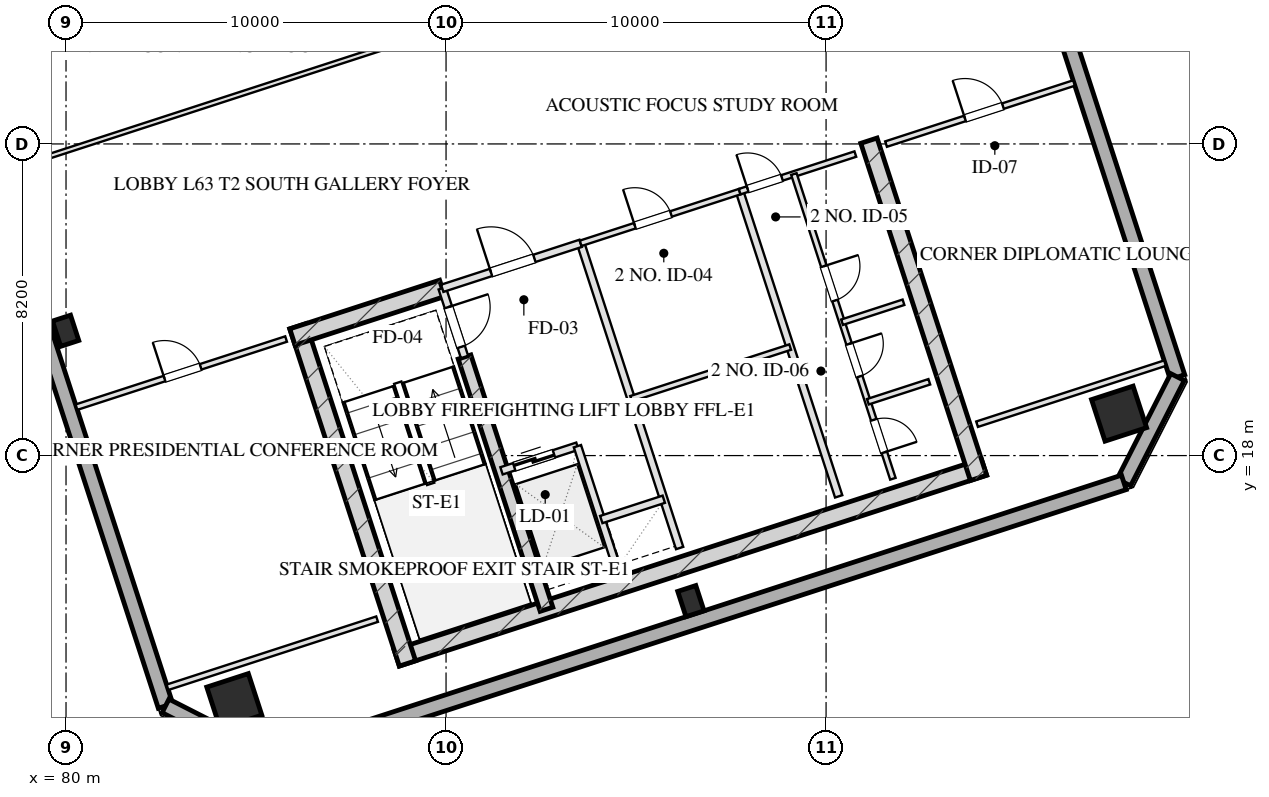
"""IFC4 building model, lengths in metres.
Left out: names, types, materials, properties, quantities, classifications, styles, units other than length and angle.
Written with IfcOpenShell. Run it as: python <this file> out.ifc"""

import sys

from ifc_helpers import new_model, si_unit, direction, frame, frame_2d, origin, origin_2d, place, context, subcontext, project, spatial, rectangle, hollow_rectangle, extrude, element, fill, save


model = new_model("IFC4")
c1 = context("Model", 3, precision=1e-05, world=origin(), true_north=direction((0.0, 1.0)))
c2 = subcontext(c1, "Body", "Model", "MODEL_VIEW")
j1 = project(units=[si_unit("LENGTHUNIT", "METRE"), si_unit("PLANEANGLEUNIT", "RADIAN")], contexts=[c1])
p1 = place(None, origin())
s1 = spatial("IfcSite", under=j1, at=p1, CompositionType="ELEMENT")
p2 = place(p1, origin())
s2 = spatial("IfcBuilding", under=s1, at=p2, CompositionType="ELEMENT")
p3 = place(p2, frame((0.0, 0.0, 234.4)))
s3 = spatial("IfcBuildingStorey", under=s2, at=p3, CompositionType="ELEMENT", Elevation=234.4)
p4 = place(p3, frame((88.701, 12.675, 0.0), z_axis=(0.0, 0.0, 1.0), x_axis=(0.95105824505, 0.309011673763, 0.0)))
e1 = element("IfcWall", 1, at=p4, inside=s3, PredefinedType="SHEAR", context=c2, shape_type="SweptSolid", body=[
    extrude(rectangle(XDim=16.25, YDim=0.45, at=frame_2d((8.125, 0.0))), origin(), (0.0, 0.0, 1.0), 3.2),
])
for number, where, z_axis, x_axis in (
    (2, (86.102, 21.404, 0.0), (0.0, 0.0, 1.0), (0.309, -0.951, 0.0)),
    (3, (101.128, 26.286, 0.0), (0.0, 0.0, 1.0), (0.309, -0.951, 0.0)),
):
    element("IfcWall", number, at=place(p3, frame(where, z_axis=z_axis, x_axis=x_axis)), inside=s3, PredefinedType="SHEAR", context=c2, shape_type="SweptSolid", body=[
        extrude(rectangle(XDim=9.33, YDim=0.45, at=frame_2d((4.665, 0.0))), origin(), (0.0, 0.0, 1.0), 3.2),
    ])
p5 = place(p3, frame((90.486, 20.594, 0.0), z_axis=(0.0, 0.0, 1.0), x_axis=(0.309020428229, -0.951055400562, 0.0)))
e4 = element("IfcWall", 4, at=p5, inside=s3, PredefinedType="SHEAR", context=c2, shape_type="SweptSolid", body=[
    extrude(rectangle(XDim=6.98, YDim=0.35, at=frame_2d((3.49, 0.0))), origin(), (0.0, 0.0, 1.0), 3.2),
])
p6 = place(p3, frame((85.957, 21.12, 0.0), z_axis=(0.0, 0.0, 1.0), x_axis=(0.951064796122, 0.308991510526, 0.0)))
e5 = element("IfcWall", 5, at=p6, inside=s3, PredefinedType="SHEAR", context=c2, shape_type="SweptSolid", body=[
    extrude(rectangle(XDim=4.145, YDim=0.45, at=frame_2d((2.073, 0.0))), origin(), (0.0, 0.0, 1.0), 3.2),
])
for number, where, z_axis, x_axis in (
    (6, (84.428, 11.539, 0.0), (0.0, 0.0, 1.0), (0.951, 0.309, 0.0)),
    (7, (107.71, 19.104, 0.0), (0.0, 0.0, 1.0), (0.951, 0.309, 0.0)),
):
    element("IfcColumn", number, at=place(p3, frame(where, z_axis=z_axis, x_axis=x_axis)), inside=s3, PredefinedType="COLUMN", context=c2, shape_type="SweptSolid", body=[
        extrude(hollow_rectangle(XDim=1.15, YDim=1.15, WallThickness=0.04, at=origin_2d()), origin(), (0.0, 0.0, 1.0), 3.201),
    ])
for number, where, z_axis, x_axis in (
    (8, (79.99, 21.284, 0.0), (0.0, 0.0, 1.0), (0.951, 0.309, 0.0)),
    (9, (96.443, 14.17, 0.0), (0.0, 0.0, 1.0), (0.951, 0.309, 0.0)),
):
    element("IfcColumn", number, at=place(p3, frame(where, z_axis=z_axis, x_axis=x_axis)), inside=s3, PredefinedType="COLUMN", context=c2, shape_type="SweptSolid", body=[
        extrude(hollow_rectangle(XDim=0.5, YDim=0.7, WallThickness=0.025, at=origin_2d()), origin(), (0.0, 0.0, 1.0), 3.201),
    ])
p7 = place(p3, frame((82.618, 11.414, 0.0), z_axis=(0.0, 0.0, 1.0), x_axis=(-0.309016491071, 0.951056679828, 0.0)))
e10 = element("IfcWall", 10, at=p7, inside=s3, PredefinedType="SOLIDWALL", context=c2, shape_type="SweptSolid", body=[
    extrude(rectangle(XDim=38.4, YDim=0.4, at=frame_2d((19.2, 0.0))), origin(), (0.0, 0.0, 1.0), 2.36),
])
p8 = place(p7, frame((11.825, 0.0, 0.75)))
e11 = element("IfcOpeningElement", 11, at=p8, cuts=e10, PredefinedType="OPENING", context=c2, shape_type="SweptSolid", body=[
    extrude(rectangle(XDim=1.95, YDim=1.21, at=frame_2d((0.975, 0.605))), frame((0.0, 0.21, 0.0), z_axis=(0.0, -1.0, 0.0), x_axis=(1.0, 0.0, 0.0)), (0.0, 0.0, 1.0), 0.42),
])
p9 = place(p7, frame((15.625, 0.0, 0.75)))
e12 = element("IfcOpeningElement", 12, at=p9, cuts=e10, PredefinedType="OPENING", context=c2, shape_type="SweptSolid", body=[
    extrude(rectangle(XDim=1.95, YDim=1.21, at=frame_2d((0.975, 0.605))), frame((0.0, 0.21, 0.0), z_axis=(0.0, -1.0, 0.0), x_axis=(1.0, 0.0, 0.0)), (0.0, 0.0, 1.0), 0.42),
])
p10 = place(p7, frame((20.825, 0.0, 0.75)))
e13 = element("IfcOpeningElement", 13, at=p10, cuts=e10, PredefinedType="OPENING", context=c2, shape_type="SweptSolid", body=[
    extrude(rectangle(XDim=1.95, YDim=1.21, at=frame_2d((0.975, 0.605))), frame((0.0, 0.21, 0.0), z_axis=(0.0, -1.0, 0.0), x_axis=(1.0, 0.0, 0.0)), (0.0, 0.0, 1.0), 0.42),
])
p11 = place(p7, frame((24.625, 0.0, 0.75)))
e14 = element("IfcOpeningElement", 14, at=p11, cuts=e10, PredefinedType="OPENING", context=c2, shape_type="SweptSolid", body=[
    extrude(rectangle(XDim=1.95, YDim=1.21, at=frame_2d((0.975, 0.605))), frame((0.0, 0.21, 0.0), z_axis=(0.0, -1.0, 0.0), x_axis=(1.0, 0.0, 0.0)), (0.0, 0.0, 1.0), 0.42),
])
p12 = place(p3, frame((97.382, 56.586, 0.0), z_axis=(0.0, 0.0, 1.0), x_axis=(0.309016491071, -0.951056679828, 0.0)))
e15 = element("IfcWall", 15, at=p12, inside=s3, PredefinedType="SOLIDWALL", context=c2, shape_type="SweptSolid", body=[
    extrude(rectangle(XDim=38.4, YDim=0.4, at=frame_2d((19.2, 0.0))), origin(), (0.0, 0.0, 1.0), 2.36),
])
p13 = place(p12, frame((24.625, 0.0, 0.75)))
e16 = element("IfcOpeningElement", 16, at=p13, cuts=e15, PredefinedType="OPENING", context=c2, shape_type="SweptSolid", body=[
    extrude(rectangle(XDim=1.95, YDim=1.21, at=frame_2d((0.975, 0.605))), frame((0.0, 0.21, 0.0), z_axis=(0.0, -1.0, 0.0), x_axis=(1.0, 0.0, 0.0)), (0.0, 0.0, 1.0), 0.42),
])
p14 = place(p12, frame((20.825, 0.0, 0.75)))
e17 = element("IfcOpeningElement", 17, at=p14, cuts=e15, PredefinedType="OPENING", context=c2, shape_type="SweptSolid", body=[
    extrude(rectangle(XDim=1.95, YDim=1.21, at=frame_2d((0.975, 0.605))), frame((0.0, 0.21, 0.0), z_axis=(0.0, -1.0, 0.0), x_axis=(1.0, 0.0, 0.0)), (0.0, 0.0, 1.0), 0.42),
])
p15 = place(p12, frame((15.625, 0.0, 0.75)))
e18 = element("IfcOpeningElement", 18, at=p15, cuts=e15, PredefinedType="OPENING", context=c2, shape_type="SweptSolid", body=[
    extrude(rectangle(XDim=1.95, YDim=1.21, at=frame_2d((0.975, 0.605))), frame((0.0, 0.21, 0.0), z_axis=(0.0, -1.0, 0.0), x_axis=(1.0, 0.0, 0.0)), (0.0, 0.0, 1.0), 0.42),
])
p16 = place(p12, frame((11.825, 0.0, 0.75)))
e19 = element("IfcOpeningElement", 19, at=p16, cuts=e15, PredefinedType="OPENING", context=c2, shape_type="SweptSolid", body=[
    extrude(rectangle(XDim=1.95, YDim=1.21, at=frame_2d((0.975, 0.605))), frame((0.0, 0.21, 0.0), z_axis=(0.0, -1.0, 0.0), x_axis=(1.0, 0.0, 0.0)), (0.0, 0.0, 1.0), 0.42),
])
p17 = place(p3, frame((109.248, 20.066, 0.0), z_axis=(0.0, 0.0, 1.0), x_axis=(-0.453949291228, -0.891027519774, 0.0)))
e20 = element("IfcWall", 20, at=p17, inside=s3, PredefinedType="SOLIDWALL", context=c2, shape_type="SweptSolid", body=[
    extrude(rectangle(XDim=3.111, YDim=0.4, at=frame_2d((1.556, 0.0))), origin(), (0.0, 0.0, 1.0), 2.36),
])
p18 = place(p3, frame((107.835, 17.294, 0.0), z_axis=(0.0, 0.0, 1.0), x_axis=(-0.951058012937, -0.309012388148, 0.0)))
e21 = element("IfcWall", 21, at=p18, inside=s3, PredefinedType="SOLIDWALL", context=c2, shape_type="SweptSolid", body=[
    extrude(rectangle(XDim=23.6, YDim=0.4, at=frame_2d((11.8, 0.0))), origin(), (0.0, 0.0, 1.0), 2.36),
])
p19 = place(p3, frame((85.39, 10.001, 0.0), z_axis=(0.0, 0.0, 1.0), x_axis=(-0.890979603174, 0.454043331334, 0.0)))
e22 = element("IfcWall", 22, at=p19, inside=s3, PredefinedType="SOLIDWALL", context=c2, shape_type="SweptSolid", body=[
    extrude(rectangle(XDim=3.111, YDim=0.4, at=frame_2d((1.556, 0.0))), origin(), (0.0, 0.0, 1.0), 2.36),
])
p20 = place(p3, frame((89.899, 22.401, 0.0), z_axis=(0.0, 0.0, 1.0), x_axis=(0.308932062672, -0.951084108086, 0.0)))
e23 = element("IfcWall", 23, at=p20, inside=s3, PredefinedType="PARTITIONING", context=c2, shape_type="SweptSolid", body=[
    extrude(rectangle(XDim=1.9, YDim=0.2, at=frame_2d((0.95, 0.0))), origin(), (0.0, 0.0, 1.0), 2.925),
])
p21 = place(p20, frame((0.52, 0.0, 0.0)))
e24 = element("IfcOpeningElement", 24, at=p21, cuts=e23, PredefinedType="OPENING", context=c2, shape_type="SweptSolid", body=[
    extrude(rectangle(XDim=1.1, YDim=2.05, at=frame_2d((0.55, 1.025))), frame((0.0, 0.11, 0.0), z_axis=(0.0, -1.0, 0.0), x_axis=(1.0, 0.0, 0.0)), (0.0, 0.0, 1.0), 0.22),
])
p22 = place(p3, frame((93.542, 23.585, 0.0), z_axis=(0.0, 0.0, 1.0), x_axis=(0.309042196757, -0.951048327176, 0.0)))
e25 = element("IfcWall", 25, at=p22, inside=s3, PredefinedType="PARTITIONING", context=c2, shape_type="SweptSolid", body=[
    extrude(rectangle(XDim=8.43, YDim=0.2, at=frame_2d((4.215, 0.0))), origin(), (0.0, 0.0, 1.0), 2.925),
])
p23 = place(p3, frame((89.899, 22.401, 0.0), z_axis=(0.0, 0.0, 1.0), x_axis=(0.951046716504, 0.309047153403, 0.0)))
e26 = element("IfcWall", 26, at=p23, inside=s3, PredefinedType="PARTITIONING", context=c2, shape_type="SweptSolid", body=[
    extrude(rectangle(XDim=3.83, YDim=0.2, at=frame_2d((1.915, 0.0))), origin(), (0.0, 0.0, 1.0), 2.925),
])
p24 = place(p23, frame((1.35, 0.0, 0.0)))
e27 = element("IfcOpeningElement", 27, at=p24, cuts=e26, PredefinedType="OPENING", context=c2, shape_type="SweptSolid", body=[
    extrude(rectangle(XDim=1.2, YDim=2.05, at=frame_2d((0.6, 1.025))), frame((0.0, 0.11, 0.0), z_axis=(0.0, -1.0, 0.0), x_axis=(1.0, 0.0, 0.0)), (0.0, 0.0, 1.0), 0.22),
])
p25 = place(p3, frame((91.46, 17.598, 0.0), z_axis=(0.0, 0.0, 1.0), x_axis=(0.951062257173, 0.308999325213, 0.0)))
e28 = element("IfcWall", 28, at=p25, inside=s3, PredefinedType="PARTITIONING", context=c2, shape_type="SweptSolid", body=[
    extrude(rectangle(XDim=2.1, YDim=0.2, at=frame_2d((1.05, 0.0))), origin(), (0.0, 0.0, 1.0), 2.925),
])
p26 = place(p25, frame((0.35, 0.0, 0.0)))
e29 = element("IfcOpeningElement", 29, at=p26, cuts=e28, PredefinedType="OPENING", context=c2, shape_type="SweptSolid", body=[
    extrude(rectangle(XDim=1.1, YDim=2.05, at=frame_2d((0.55, 1.025))), frame((0.0, 0.11, 0.0), z_axis=(0.0, -1.0, 0.0), x_axis=(1.0, 0.0, 0.0)), (0.0, 0.0, 1.0), 0.22),
])
p27 = place(p3, frame((93.457, 18.247, 0.0), z_axis=(0.0, 0.0, 1.0), x_axis=(0.3089935693, -0.951064127245, 0.0)))
e30 = element("IfcWall", 30, at=p27, inside=s3, PredefinedType="PARTITIONING", context=c2, shape_type="SweptSolid", body=[
    extrude(rectangle(XDim=3.7, YDim=0.2, at=frame_2d((1.85, 0.0))), origin(), (0.0, 0.0, 1.0), 2.925),
])
p28 = place(p3, frame((94.084, 16.317, 0.0), z_axis=(0.0, 0.0, 1.0), x_axis=(0.951041328149, 0.309063734775, 0.0)))
e31 = element("IfcWall", 31, at=p28, inside=s3, PredefinedType="PARTITIONING", context=c2, shape_type="SweptSolid", body=[
    extrude(rectangle(XDim=1.73, YDim=0.2, at=frame_2d((0.865, 0.0))), origin(), (0.0, 0.0, 1.0), 2.925),
])
p29 = place(p3, frame((97.727, 24.944, 0.0), z_axis=(0.0, 0.0, 1.0), x_axis=(0.309016001439, -0.951056838919, 0.0)))
e32 = element("IfcWall", 32, at=p29, inside=s3, PredefinedType="PARTITIONING", context=c2, shape_type="SweptSolid", body=[
    extrude(rectangle(XDim=8.43, YDim=0.2, at=frame_2d((4.215, 0.0))), origin(), (0.0, 0.0, 1.0), 2.925),
])
p30 = place(p3, frame((93.542, 23.585, 0.0), z_axis=(0.0, 0.0, 1.0), x_axis=(0.951063829732, 0.308994485023, 0.0)))
e33 = element("IfcWall", 33, at=p30, inside=s3, PredefinedType="PARTITIONING", context=c2, shape_type="SweptSolid", body=[
    extrude(rectangle(XDim=4.4, YDim=0.15, at=frame_2d((2.2, 0.0))), origin(), (0.0, 0.0, 1.0), 2.925),
])
p31 = place(p30, frame((1.5, 0.0, 0.0)))
e34 = element("IfcOpeningElement", 34, at=p31, cuts=e33, PredefinedType="OPENING", context=c2, shape_type="SweptSolid", body=[
    extrude(rectangle(XDim=1.0, YDim=2.05, at=frame_2d((0.5, 1.025))), frame((0.0, 0.085, 0.0), z_axis=(0.0, -1.0, 0.0), x_axis=(1.0, 0.0, 0.0)), (0.0, 0.0, 1.0), 0.17),
])
p32 = place(p3, frame((94.871, 19.495, 0.0), z_axis=(0.0, 0.0, 1.0), x_axis=(0.951042223598, 0.309060979314, 0.0)))
e35 = element("IfcWall", 35, at=p32, inside=s3, PredefinedType="PARTITIONING", context=c2, shape_type="SweptSolid", body=[
    extrude(rectangle(XDim=4.4, YDim=0.15, at=frame_2d((2.2, 0.0))), origin(), (0.0, 0.0, 1.0), 2.925),
])
p33 = place(p3, frame((97.727, 24.944, 0.0), z_axis=(0.0, 0.0, 1.0), x_axis=(0.951036872128, 0.309077446369, 0.0)))
e36 = element("IfcWall", 36, at=p33, inside=s3, PredefinedType="PARTITIONING", context=c2, shape_type="SweptSolid", body=[
    extrude(rectangle(XDim=3.2, YDim=0.15, at=frame_2d((1.6, 0.0))), origin(), (0.0, 0.0, 1.0), 2.925),
])
p34 = place(p33, frame((0.22, 0.0, 0.0)))
e37 = element("IfcOpeningElement", 37, at=p34, cuts=e36, PredefinedType="OPENING", context=c2, shape_type="SweptSolid", body=[
    extrude(rectangle(XDim=0.95, YDim=2.05, at=frame_2d((0.475, 1.025))), frame((0.0, 0.085, 0.0), z_axis=(0.0, -1.0, 0.0), x_axis=(1.0, 0.0, 0.0)), (0.0, 0.0, 1.0), 0.17),
])
p35 = place(p3, frame((99.153, 25.408, 0.0), z_axis=(0.0, 0.0, 1.0), x_axis=(0.309016001439, -0.951056838919, 0.0)))
e38 = element("IfcWall", 38, at=p35, inside=s3, PredefinedType="PARTITIONING", context=c2, shape_type="SweptSolid", body=[
    extrude(rectangle(XDim=8.43, YDim=0.15, at=frame_2d((4.215, 0.0))), origin(), (0.0, 0.0, 1.0), 2.925),
])
p36 = place(p35, frame((2.55, 0.0, 0.0)))
e39 = element("IfcOpeningElement", 39, at=p36, cuts=e38, PredefinedType="OPENING", context=c2, shape_type="SweptSolid", body=[
    extrude(rectangle(XDim=0.95, YDim=2.05, at=frame_2d((0.475, 1.025))), frame((0.0, 0.085, 0.0), z_axis=(0.0, -1.0, 0.0), x_axis=(1.0, 0.0, 0.0)), (0.0, 0.0, 1.0), 0.17),
])
p37 = place(p35, frame((4.7, 0.0, 0.0)))
e40 = element("IfcOpeningElement", 40, at=p37, cuts=e38, PredefinedType="OPENING", context=c2, shape_type="SweptSolid", body=[
    extrude(rectangle(XDim=0.9, YDim=2.05, at=frame_2d((0.45, 1.025))), frame((0.0, 0.085, 0.0), z_axis=(0.0, -1.0, 0.0), x_axis=(1.0, 0.0, 0.0)), (0.0, 0.0, 1.0), 0.17),
])
p38 = place(p35, frame((6.8, 0.0, 0.0)))
e41 = element("IfcOpeningElement", 41, at=p38, cuts=e38, PredefinedType="OPENING", context=c2, shape_type="SweptSolid", body=[
    extrude(rectangle(XDim=0.9, YDim=2.05, at=frame_2d((0.45, 1.025))), frame((0.0, 0.085, 0.0), z_axis=(0.0, -1.0, 0.0), x_axis=(1.0, 0.0, 0.0)), (0.0, 0.0, 1.0), 0.17),
])
p39 = place(p3, frame((100.42, 21.509, 0.0), z_axis=(0.0, 0.0, 1.0), x_axis=(0.951040401051, 0.309066587596, 0.0)))
e42 = element("IfcWall", 42, at=p39, inside=s3, PredefinedType="PARTITIONING", context=c2, shape_type="SweptSolid", body=[
    extrude(rectangle(XDim=1.7, YDim=0.15, at=frame_2d((0.85, 0.0))), origin(), (0.0, 0.0, 1.0), 2.925),
])
p40 = place(p3, frame((101.1, 19.416, 0.0), z_axis=(0.0, 0.0, 1.0), x_axis=(0.951054116971, 0.309024378638, 0.0)))
e43 = element("IfcWall", 43, at=p40, inside=s3, PredefinedType="PARTITIONING", context=c2, shape_type="SweptSolid", body=[
    extrude(rectangle(XDim=1.7, YDim=0.15, at=frame_2d((0.85, 0.0))), origin(), (0.0, 0.0, 1.0), 2.925),
])
p41 = place(p3, frame((82.669, 11.903, 0.0), z_axis=(0.0, 0.0, 1.0), x_axis=(0.951059431056, 0.309008023519, 0.0)))
e44 = element("IfcWall", 44, at=p41, inside=s3, PredefinedType="PARTITIONING", context=c2, shape_type="SweptSolid", body=[
    extrude(rectangle(XDim=5.8, YDim=0.15, at=frame_2d((2.9, 0.0))), origin(), (0.0, 0.0, 1.0), 2.925),
])
p42 = place(p3, frame((80.275, 19.274, 0.0), z_axis=(0.0, 0.0, 1.0), x_axis=(0.951059431056, 0.309008023519, 0.0)))
e45 = element("IfcWall", 45, at=p42, inside=s3, PredefinedType="PARTITIONING", context=c2, shape_type="SweptSolid", body=[
    extrude(rectangle(XDim=5.8, YDim=0.15, at=frame_2d((2.9, 0.0))), origin(), (0.0, 0.0, 1.0), 2.925),
])
p43 = place(p42, frame((2.436, 0.0, 0.0)))
e46 = element("IfcOpeningElement", 46, at=p43, cuts=e45, PredefinedType="OPENING", context=c2, shape_type="SweptSolid", body=[
    extrude(rectangle(XDim=1.0, YDim=2.05, at=frame_2d((0.5, 1.025))), frame((0.0, 0.085, 0.0), z_axis=(0.0, -1.0, 0.0), x_axis=(1.0, 0.0, 0.0)), (0.0, 0.0, 1.0), 0.17),
])
p44 = place(p3, frame((103.973, 18.825, 0.0), z_axis=(0.0, 0.0, 1.0), x_axis=(0.951055112834, 0.309021313752, 0.0)))
e47 = element("IfcWall", 47, at=p44, inside=s3, PredefinedType="PARTITIONING", context=c2, shape_type="SweptSolid", body=[
    extrude(rectangle(XDim=5.2, YDim=0.15, at=frame_2d((2.6, 0.0))), origin(), (0.0, 0.0, 1.0), 2.925),
])
p45 = place(p3, frame((101.578, 26.196, 0.0), z_axis=(0.0, 0.0, 1.0), x_axis=(0.951064427824, 0.308992644131, 0.0)))
e48 = element("IfcWall", 48, at=p45, inside=s3, PredefinedType="PARTITIONING", context=c2, shape_type="SweptSolid", body=[
    extrude(rectangle(XDim=5.2, YDim=0.15, at=frame_2d((2.6, 0.0))), origin(), (0.0, 0.0, 1.0), 2.925),
])
p46 = place(p45, frame((2.184, 0.0, 0.0)))
e49 = element("IfcOpeningElement", 49, at=p46, cuts=e48, PredefinedType="OPENING", context=c2, shape_type="SweptSolid", body=[
    extrude(rectangle(XDim=1.05, YDim=2.05, at=frame_2d((0.525, 1.025))), frame((0.0, 0.085, 0.0), z_axis=(0.0, -1.0, 0.0), x_axis=(1.0, 0.0, 0.0)), (0.0, 0.0, 1.0), 0.17),
])
p47 = place(p3, frame((78.266, 25.456, 0.0), z_axis=(0.0, 0.0, 1.0), x_axis=(0.951056072529, 0.309018360142, 0.0)))
e50 = element("IfcWall", 50, at=p47, inside=s3, PredefinedType="PARTITIONING", context=c2, shape_type="SweptSolid", body=[
    extrude(rectangle(XDim=10.925, YDim=0.12, at=frame_2d((5.462, 0.0))), origin(), (0.0, 0.0, 1.0), 2.925),
])
p48 = place(p21, origin())
e51 = element("IfcDoor", 51, at=p48, inside=s3, OperationType="SINGLE_SWING_LEFT", PredefinedType="DOOR", context=c2, shape_type="SweptSolid", body=[
    extrude(rectangle(XDim=1.1, YDim=2.05, at=frame_2d((0.55, 1.025))), frame((0.0, 0.025, 0.0), z_axis=(0.0, -1.0, 0.0), x_axis=(1.0, 0.0, 0.0)), (0.0, 0.0, 1.0), 0.05),
])
fill(e24, e51)
p49 = place(p24, origin())
e52 = element("IfcDoor", 52, at=p49, inside=s3, OperationType="SINGLE_SWING_LEFT", PredefinedType="DOOR", context=c2, shape_type="SweptSolid", body=[
    extrude(rectangle(XDim=1.2, YDim=2.05, at=frame_2d((0.6, 1.025))), frame((0.0, 0.025, 0.0), z_axis=(0.0, -1.0, 0.0), x_axis=(1.0, 0.0, 0.0)), (0.0, 0.0, 1.0), 0.05),
])
fill(e27, e52)
p50 = place(p26, origin())
e53 = element("IfcDoor", 53, at=p50, inside=s3, OperationType="DOUBLE_DOOR_SLIDING", PredefinedType="DOOR", context=c2, shape_type="SweptSolid", body=[
    extrude(rectangle(XDim=1.1, YDim=2.05, at=frame_2d((0.55, 1.025))), frame((0.0, 0.025, 0.0), z_axis=(0.0, -1.0, 0.0), x_axis=(1.0, 0.0, 0.0)), (0.0, 0.0, 1.0), 0.05),
])
fill(e29, e53)
p51 = place(p31, origin())
e54 = element("IfcDoor", 54, at=p51, inside=s3, OperationType="SINGLE_SWING_LEFT", PredefinedType="DOOR", context=c2, shape_type="SweptSolid", body=[
    extrude(rectangle(XDim=1.0, YDim=2.05, at=frame_2d((0.5, 1.025))), frame((0.0, 0.025, 0.0), z_axis=(0.0, -1.0, 0.0), x_axis=(1.0, 0.0, 0.0)), (0.0, 0.0, 1.0), 0.05),
])
fill(e34, e54)
p52 = place(p34, origin())
e55 = element("IfcDoor", 55, at=p52, inside=s3, OperationType="SINGLE_SWING_LEFT", PredefinedType="DOOR", context=c2, shape_type="SweptSolid", body=[
    extrude(rectangle(XDim=0.95, YDim=2.05, at=frame_2d((0.475, 1.025))), frame((0.0, 0.025, 0.0), z_axis=(0.0, -1.0, 0.0), x_axis=(1.0, 0.0, 0.0)), (0.0, 0.0, 1.0), 0.05),
])
fill(e37, e55)
p53 = place(p36, origin())
e56 = element("IfcDoor", 56, at=p53, inside=s3, OperationType="SINGLE_SWING_LEFT", PredefinedType="DOOR", context=c2, shape_type="SweptSolid", body=[
    extrude(rectangle(XDim=0.95, YDim=2.05, at=frame_2d((0.475, 1.025))), frame((0.0, 0.025, 0.0), z_axis=(0.0, -1.0, 0.0), x_axis=(1.0, 0.0, 0.0)), (0.0, 0.0, 1.0), 0.05),
])
fill(e39, e56)
p54 = place(p37, origin())
e57 = element("IfcDoor", 57, at=p54, inside=s3, OperationType="SINGLE_SWING_LEFT", PredefinedType="DOOR", context=c2, shape_type="SweptSolid", body=[
    extrude(rectangle(XDim=0.9, YDim=2.05, at=frame_2d((0.45, 1.025))), frame((0.0, 0.025, 0.0), z_axis=(0.0, -1.0, 0.0), x_axis=(1.0, 0.0, 0.0)), (0.0, 0.0, 1.0), 0.05),
])
fill(e40, e57)
p55 = place(p38, origin())
e58 = element("IfcDoor", 58, at=p55, inside=s3, OperationType="SINGLE_SWING_RIGHT", PredefinedType="DOOR", context=c2, shape_type="SweptSolid", body=[
    extrude(rectangle(XDim=0.9, YDim=2.05, at=frame_2d((0.45, 1.025))), frame((0.0, 0.025, 0.0), z_axis=(0.0, -1.0, 0.0), x_axis=(1.0, 0.0, 0.0)), (0.0, 0.0, 1.0), 0.05),
])
fill(e41, e58)
p56 = place(p43, origin())
e59 = element("IfcDoor", 59, at=p56, inside=s3, OperationType="SINGLE_SWING_LEFT", PredefinedType="DOOR", context=c2, shape_type="SweptSolid", body=[
    extrude(rectangle(XDim=1.0, YDim=2.05, at=frame_2d((0.5, 1.025))), frame((0.0, 0.025, 0.0), z_axis=(0.0, -1.0, 0.0), x_axis=(1.0, 0.0, 0.0)), (0.0, 0.0, 1.0), 0.05),
])
fill(e46, e59)
p57 = place(p46, origin())
e60 = element("IfcDoor", 60, at=p57, inside=s3, OperationType="SINGLE_SWING_LEFT", PredefinedType="DOOR", context=c2, shape_type="SweptSolid", body=[
    extrude(rectangle(XDim=1.05, YDim=2.05, at=frame_2d((0.525, 1.025))), frame((0.0, 0.025, 0.0), z_axis=(0.0, -1.0, 0.0), x_axis=(1.0, 0.0, 0.0)), (0.0, 0.0, 1.0), 0.05),
])
fill(e49, e60)
save(model, sys.argv[1])
